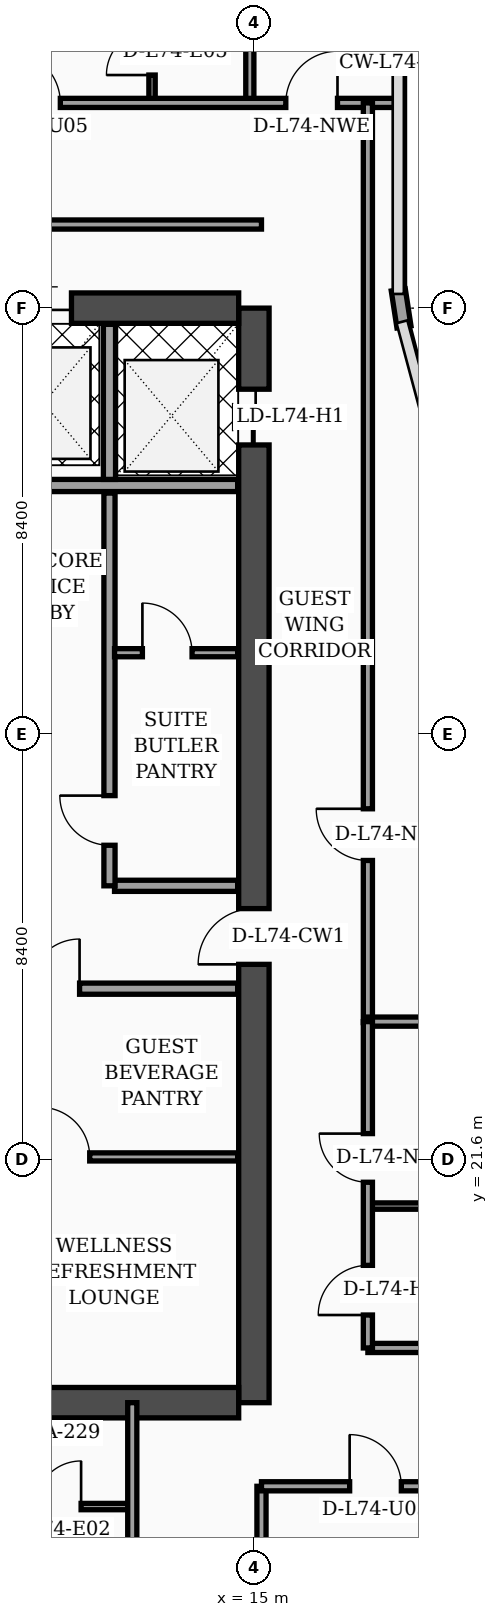
"""IFC4 building model, lengths in metres.
Left out: names, types, materials, properties, quantities, classifications, styles, units other than length and angle.
Written with IfcOpenShell. Run it as: python <this file> out.ifc"""

import sys

from ifc_helpers import new_model, si_unit, direction, frame, frame_2d, origin, place, context, subcontext, project, spatial, rectangle, extrude, element, fill, save


model = new_model("IFC4")
c1 = context("Model", 3, precision=1e-05, world=origin(), true_north=direction((0.0, 1.0)))
c2 = subcontext(c1, "Body", "Model", "MODEL_VIEW")
j1 = project(units=[si_unit("LENGTHUNIT", "METRE"), si_unit("PLANEANGLEUNIT", "RADIAN")], contexts=[c1])
p1 = place(None, origin())
s1 = spatial("IfcSite", under=j1, at=p1, CompositionType="ELEMENT")
p2 = place(p1, origin())
s2 = spatial("IfcBuilding", under=s1, at=p2, CompositionType="ELEMENT")
p3 = place(p2, frame((0.0, 0.0, 298.7)))
s3 = spatial("IfcBuildingStorey", under=s2, at=p3, CompositionType="ELEMENT", Elevation=298.7)
p4 = place(p3, frame((15.0, 16.8, 0.0), z_axis=(0.0, 0.0, 1.0), x_axis=(0.0, 1.0, 0.0)))
e1 = element("IfcWall", 1, at=p4, inside=s3, PredefinedType="SHEAR", context=c2, shape_type="SweptSolid", body=[
    extrude(rectangle(XDim=21.6, YDim=0.6, at=frame_2d((10.8, 0.0))), origin(), (0.0, 0.0, 1.0), 3.56),
])
p5 = place(p4, frame((8.65, 0.0, 0.0)))
e2 = element("IfcOpeningElement", 2, at=p5, cuts=e1, PredefinedType="OPENING", context=c2, shape_type="SweptSolid", body=[
    extrude(rectangle(XDim=1.1, YDim=2.2, at=frame_2d((0.55, 1.1))), frame((0.0, 0.31, 0.0), z_axis=(0.0, -1.0, 0.0), x_axis=(1.0, 0.0, 0.0)), (0.0, 0.0, 1.0), 0.62),
])
p6 = place(p4, frame((18.9, 0.0, 0.0)))
e3 = element("IfcOpeningElement", 3, at=p6, cuts=e1, PredefinedType="OPENING", context=c2, shape_type="SweptSolid", body=[
    extrude(rectangle(XDim=1.1, YDim=2.2, at=frame_2d((0.55, 1.1))), frame((0.0, 0.31, 0.0), z_axis=(0.0, -1.0, 0.0), x_axis=(1.0, 0.0, 0.0)), (0.0, 0.0, 1.0), 0.62),
])
p7 = place(p3, frame((4.5, 38.4, 0.0), z_axis=(0.0, 0.0, 1.0), x_axis=(1.0, 0.0, 0.0)))
e4 = element("IfcWall", 4, at=p7, inside=s3, PredefinedType="SHEAR", context=c2, shape_type="SweptSolid", body=[
    extrude(rectangle(XDim=10.2, YDim=0.6, at=frame_2d((5.1, 0.0))), origin(), (0.0, 0.0, 1.0), 3.56),
])
p8 = place(p7, frame((5.8, 0.0, 0.0)))
e5 = element("IfcOpeningElement", 5, at=p8, cuts=e4, PredefinedType="OPENING", context=c2, shape_type="SweptSolid", body=[
    extrude(rectangle(XDim=1.1, YDim=2.2, at=frame_2d((0.55, 1.1))), frame((0.0, 0.31, 0.0), z_axis=(0.0, -1.0, 0.0), x_axis=(1.0, 0.0, 0.0)), (0.0, 0.0, 1.0), 0.62),
])
p9 = place(p3, frame((4.5, 16.8, 0.0), z_axis=(0.0, 0.0, 1.0), x_axis=(1.0, 0.0, 0.0)))
e6 = element("IfcWall", 6, at=p9, inside=s3, PredefinedType="SHEAR", context=c2, shape_type="SweptSolid", body=[
    extrude(rectangle(XDim=10.2, YDim=0.6, at=frame_2d((5.1, 0.0))), origin(), (0.0, 0.0, 1.0), 3.56),
])
p10 = place(p3, frame((17.962, 38.03, 0.0), z_axis=(0.0, 0.0, 1.0), x_axis=(-0.15141125477, 0.988470855377, 0.0)))
e7 = element("IfcWall", 7, at=p10, inside=s3, PredefinedType="SOLIDWALL", context=c2, shape_type="SweptSolid", body=[
    extrude(rectangle(XDim=0.739, YDim=0.28, at=frame_2d((0.369, 0.0))), origin(), (0.0, 0.0, 1.0), 3.56),
])
p11 = place(p3, frame((9.68, 21.65, 0.0), z_axis=(0.0, 0.0, 1.0), x_axis=(1.0, 0.0, 0.0)))
e8 = element("IfcWall", 8, at=p11, inside=s3, PredefinedType="PARTITIONING", context=c2, shape_type="SweptSolid", body=[
    extrude(rectangle(XDim=5.0, YDim=0.16, at=frame_2d((2.5, 0.0))), origin(), (0.0, 0.0, 1.0), 3.09),
])
p12 = place(p11, frame((1.1, 0.0, 0.0)))
e9 = element("IfcOpeningElement", 9, at=p12, cuts=e8, PredefinedType="OPENING", context=c2, shape_type="SweptSolid", body=[
    extrude(rectangle(XDim=0.98, YDim=2.15, at=frame_2d((0.49, 1.075))), frame((0.0, 0.09, 0.0), z_axis=(0.0, -1.0, 0.0), x_axis=(1.0, 0.0, 0.0)), (0.0, 0.0, 1.0), 0.18),
])
p13 = place(p3, frame((9.68, 24.97, 0.0), z_axis=(0.0, 0.0, 1.0), x_axis=(1.0, 0.0, 0.0)))
e10 = element("IfcWall", 10, at=p13, inside=s3, PredefinedType="SOLIDWALL", context=c2, shape_type="SweptSolid", body=[
    extrude(rectangle(XDim=5.0, YDim=0.22, at=frame_2d((2.5, 0.0))), origin(), (0.0, 0.0, 1.0), 2.99),
])
p14 = place(p13, frame((0.9, 0.0, 0.0)))
e11 = element("IfcOpeningElement", 11, at=p14, cuts=e10, PredefinedType="OPENING", context=c2, shape_type="SweptSolid", body=[
    extrude(rectangle(XDim=0.98, YDim=2.15, at=frame_2d((0.49, 1.075))), frame((0.0, 0.12, 0.0), z_axis=(0.0, -1.0, 0.0), x_axis=(1.0, 0.0, 0.0)), (0.0, 0.0, 1.0), 0.24),
])
p15 = place(p3, frame((12.25, 27.0, 0.0), z_axis=(0.0, 0.0, 1.0), x_axis=(1.0, 0.0, 0.0)))
e12 = element("IfcWall", 12, at=p15, inside=s3, PredefinedType="SOLIDWALL", context=c2, shape_type="SweptSolid", body=[
    extrude(rectangle(XDim=2.43, YDim=0.22, at=frame_2d((1.215, 0.0))), origin(), (0.0, 0.0, 1.0), 3.56),
])
p16 = place(p3, frame((12.15, 27.0, 0.0), z_axis=(0.0, 0.0, 1.0), x_axis=(0.0, 1.0, 0.0)))
e13 = element("IfcWall", 13, at=p16, inside=s3, PredefinedType="SOLIDWALL", context=c2, shape_type="SweptSolid", body=[
    extrude(rectangle(XDim=7.75, YDim=0.22, at=frame_2d((3.875, 0.0))), origin(), (0.0, 0.0, 1.0), 3.56),
])
p17 = place(p16, frame((0.8, 0.0, 0.0)))
e14 = element("IfcOpeningElement", 14, at=p17, cuts=e13, PredefinedType="OPENING", context=c2, shape_type="SweptSolid", body=[
    extrude(rectangle(XDim=0.98, YDim=2.15, at=frame_2d((0.49, 1.075))), frame((0.0, 0.12, 0.0), z_axis=(0.0, -1.0, 0.0), x_axis=(1.0, 0.0, 0.0)), (0.0, 0.0, 1.0), 0.24),
])
p18 = place(p3, frame((12.25, 31.6, 0.0), z_axis=(0.0, 0.0, 1.0), x_axis=(1.0, 0.0, 0.0)))
e15 = element("IfcWall", 15, at=p18, inside=s3, PredefinedType="PARTITIONING", context=c2, shape_type="SweptSolid", body=[
    extrude(rectangle(XDim=2.43, YDim=0.16, at=frame_2d((1.215, 0.0))), origin(), (0.0, 0.0, 1.0), 3.14),
])
p19 = place(p18, frame((0.55, 0.0, 0.0)))
e16 = element("IfcOpeningElement", 16, at=p19, cuts=e15, PredefinedType="OPENING", context=c2, shape_type="SweptSolid", body=[
    extrude(rectangle(XDim=0.98, YDim=2.15, at=frame_2d((0.49, 1.075))), frame((0.0, 0.09, 0.0), z_axis=(0.0, -1.0, 0.0), x_axis=(1.0, 0.0, 0.0)), (0.0, 0.0, 1.0), 0.18),
])
p20 = place(p3, frame((9.66, 34.9, 0.0), z_axis=(0.0, 0.0, 1.0), x_axis=(1.0, 0.0, 0.0)))
e17 = element("IfcWall", 17, at=p20, inside=s3, PredefinedType="SOLIDWALL", context=c2, shape_type="SweptSolid", body=[
    extrude(rectangle(XDim=5.02, YDim=0.24, at=frame_2d((2.51, 0.0))), origin(), (0.0, 0.0, 1.0), 3.56),
])
p21 = place(p3, frame((12.15, 35.02, 0.0), z_axis=(0.0, 0.0, 1.0), x_axis=(0.0, 1.0, 0.0)))
e18 = element("IfcWall", 18, at=p21, inside=s3, PredefinedType="SOLIDWALL", context=c2, shape_type="SweptSolid", body=[
    extrude(rectangle(XDim=3.06, YDim=0.24, at=frame_2d((1.53, 0.0))), origin(), (0.0, 0.0, 1.0), 3.56),
])
p22 = place(p3, frame((0.08, 14.75, 0.0), z_axis=(0.0, 0.0, 1.0), x_axis=(1.0, 0.0, 0.0)))
e19 = element("IfcWall", 19, at=p22, inside=s3, PredefinedType="PARTITIONING", context=c2, shape_type="SweptSolid", body=[
    extrude(rectangle(XDim=12.52, YDim=0.125, at=frame_2d((6.26, 0.0))), origin(), (0.0, 0.0, 1.0), 2.99),
])
p23 = place(p22, frame((4.32, 0.0, 0.0)))
e20 = element("IfcOpeningElement", 20, at=p23, cuts=e19, PredefinedType="OPENING", context=c2, shape_type="SweptSolid", body=[
    extrude(rectangle(XDim=0.96, YDim=2.2, at=frame_2d((0.48, 1.1))), frame((0.0, 0.073, 0.0), z_axis=(0.0, -1.0, 0.0), x_axis=(1.0, 0.0, 0.0)), (0.0, 0.0, 1.0), 0.145),
])
p24 = place(p22, frame((10.61, 0.0, 0.0)))
e21 = element("IfcOpeningElement", 21, at=p24, cuts=e19, PredefinedType="OPENING", context=c2, shape_type="SweptSolid", body=[
    extrude(rectangle(XDim=0.9, YDim=2.15, at=frame_2d((0.45, 1.075))), frame((0.0, 0.073, 0.0), z_axis=(0.0, -1.0, 0.0), x_axis=(1.0, 0.0, 0.0)), (0.0, 0.0, 1.0), 0.145),
])
p25 = place(p3, frame((12.6, 2.44, 0.0), z_axis=(0.0, 0.0, 1.0), x_axis=(0.0, 1.0, 0.0)))
e22 = element("IfcWall", 22, at=p25, inside=s3, PredefinedType="PARTITIONING", context=c2, shape_type="SweptSolid", body=[
    extrude(rectangle(XDim=14.36, YDim=0.18, at=frame_2d((7.18, 0.0))), origin(), (0.0, 0.0, 1.0), 2.99),
])
p26 = place(p25, frame((3.01, 0.0, 0.0)))
e23 = element("IfcOpeningElement", 23, at=p26, cuts=e22, PredefinedType="OPENING", context=c2, shape_type="SweptSolid", body=[
    extrude(rectangle(XDim=1.02, YDim=2.2, at=frame_2d((0.51, 1.1))), frame((0.0, 0.1, 0.0), z_axis=(0.0, -1.0, 0.0), x_axis=(1.0, 0.0, 0.0)), (0.0, 0.0, 1.0), 0.2),
])
p27 = place(p25, frame((9.35, 0.0, 0.0)))
e24 = element("IfcOpeningElement", 24, at=p27, cuts=e22, PredefinedType="OPENING", context=c2, shape_type="SweptSolid", body=[
    extrude(rectangle(XDim=1.02, YDim=2.2, at=frame_2d((0.51, 1.1))), frame((0.0, 0.1, 0.0), z_axis=(0.0, -1.0, 0.0), x_axis=(1.0, 0.0, 0.0)), (0.0, 0.0, 1.0), 0.2),
])
p28 = place(p3, frame((15.15, 2.44, 0.0), z_axis=(0.0, 0.0, 1.0), x_axis=(0.0, 1.0, 0.0)))
e25 = element("IfcWall", 25, at=p28, inside=s3, PredefinedType="PARTITIONING", context=c2, shape_type="SweptSolid", body=[
    extrude(rectangle(XDim=12.71, YDim=0.18, at=frame_2d((6.355, 0.0))), origin(), (0.0, 0.0, 1.0), 3.09),
])
p29 = place(p3, frame((15.15, 15.15, 0.0), z_axis=(0.0, 0.0, 1.0), x_axis=(1.0, 0.0, 0.0)))
e26 = element("IfcWall", 26, at=p29, inside=s3, PredefinedType="PARTITIONING", context=c2, shape_type="SweptSolid", body=[
    extrude(rectangle(XDim=6.45, YDim=0.18, at=frame_2d((3.225, 0.0))), origin(), (0.0, 0.0, 1.0), 2.59),
])
p30 = place(p29, frame((1.74, 0.0, 0.0)))
e27 = element("IfcOpeningElement", 27, at=p30, cuts=e26, PredefinedType="OPENING", context=c2, shape_type="SweptSolid", body=[
    extrude(rectangle(XDim=1.02, YDim=2.2, at=frame_2d((0.51, 1.1))), frame((0.0, 0.1, 0.0), z_axis=(0.0, -1.0, 0.0), x_axis=(1.0, 0.0, 0.0)), (0.0, 0.0, 1.0), 0.2),
])
p31 = place(p3, frame((14.92, 42.45, 0.0), z_axis=(0.0, 0.0, 1.0), x_axis=(0.0, 1.0, 0.0)))
e28 = element("IfcWall", 28, at=p31, inside=s3, PredefinedType="PARTITIONING", context=c2, shape_type="SweptSolid", body=[
    extrude(rectangle(XDim=5.35, YDim=0.16, at=frame_2d((2.675, 0.0))), origin(), (0.0, 0.0, 1.0), 3.09),
])
p32 = place(p3, frame((12.99, 42.45, 0.0), z_axis=(0.0, 0.0, 1.0), x_axis=(0.0, 1.0, 0.0)))
e29 = element("IfcWall", 29, at=p32, inside=s3, PredefinedType="PARTITIONING", context=c2, shape_type="SweptSolid", body=[
    extrude(rectangle(XDim=8.49, YDim=0.125, at=frame_2d((4.245, 0.0))), origin(), (0.0, 0.0, 1.0), 3.09),
])
p33 = place(p32, frame((0.55, 0.0, 0.0)))
e30 = element("IfcOpeningElement", 30, at=p33, cuts=e29, PredefinedType="OPENING", context=c2, shape_type="SweptSolid", body=[
    extrude(rectangle(XDim=0.9, YDim=2.15, at=frame_2d((0.45, 1.075))), frame((0.0, 0.073, 0.0), z_axis=(0.0, -1.0, 0.0), x_axis=(1.0, 0.0, 0.0)), (0.0, 0.0, 1.0), 0.145),
])
p34 = place(p32, frame((4.72, 0.0, 0.0)))
e31 = element("IfcOpeningElement", 31, at=p34, cuts=e29, PredefinedType="OPENING", context=c2, shape_type="SweptSolid", body=[
    extrude(rectangle(XDim=0.96, YDim=2.2, at=frame_2d((0.48, 1.1))), frame((0.0, 0.073, 0.0), z_axis=(0.0, -1.0, 0.0), x_axis=(1.0, 0.0, 0.0)), (0.0, 0.0, 1.0), 0.145),
])
p35 = place(p3, frame((0.08, 42.45, 0.0), z_axis=(0.0, 0.0, 1.0), x_axis=(1.0, 0.0, 0.0)))
e32 = element("IfcWall", 32, at=p35, inside=s3, PredefinedType="PARTITIONING", context=c2, shape_type="SweptSolid", body=[
    extrude(rectangle(XDim=17.77, YDim=0.18, at=frame_2d((8.885, 0.0))), origin(), (0.0, 0.0, 1.0), 2.99),
])
p36 = place(p35, frame((0.9, 0.0, 0.0)))
e33 = element("IfcOpeningElement", 33, at=p36, cuts=e32, PredefinedType="OPENING", context=c2, shape_type="SweptSolid", body=[
    extrude(rectangle(XDim=1.02, YDim=2.2, at=frame_2d((0.51, 1.1))), frame((0.0, 0.1, 0.0), z_axis=(0.0, -1.0, 0.0), x_axis=(1.0, 0.0, 0.0)), (0.0, 0.0, 1.0), 0.2),
])
p37 = place(p35, frame((4.2, 0.0, 0.0)))
e34 = element("IfcOpeningElement", 34, at=p37, cuts=e32, PredefinedType="OPENING", context=c2, shape_type="SweptSolid", body=[
    extrude(rectangle(XDim=1.02, YDim=2.2, at=frame_2d((0.51, 1.1))), frame((0.0, 0.1, 0.0), z_axis=(0.0, -1.0, 0.0), x_axis=(1.0, 0.0, 0.0)), (0.0, 0.0, 1.0), 0.2),
])
p38 = place(p35, frame((10.08, 0.0, 0.0)))
e35 = element("IfcOpeningElement", 35, at=p38, cuts=e32, PredefinedType="OPENING", context=c2, shape_type="SweptSolid", body=[
    extrude(rectangle(XDim=1.02, YDim=2.2, at=frame_2d((0.51, 1.1))), frame((0.0, 0.1, 0.0), z_axis=(0.0, -1.0, 0.0), x_axis=(1.0, 0.0, 0.0)), (0.0, 0.0, 1.0), 0.2),
])
p39 = place(p35, frame((15.55, 0.0, 0.0)))
e36 = element("IfcOpeningElement", 36, at=p39, cuts=e32, PredefinedType="OPENING", context=c2, shape_type="SweptSolid", body=[
    extrude(rectangle(XDim=1.02, YDim=2.2, at=frame_2d((0.51, 1.1))), frame((0.0, 0.1, 0.0), z_axis=(0.0, -1.0, 0.0), x_axis=(1.0, 0.0, 0.0)), (0.0, 0.0, 1.0), 0.2),
])
p40 = place(p3, frame((17.25, 24.3, 0.0), z_axis=(0.0, 0.0, 1.0), x_axis=(0.0, 1.0, 0.0)))
e37 = element("IfcWall", 37, at=p40, inside=s3, PredefinedType="PARTITIONING", context=c2, shape_type="SweptSolid", body=[
    extrude(rectangle(XDim=18.15, YDim=0.18, at=frame_2d((9.075, 0.0))), origin(), (0.0, 0.0, 1.0), 2.99),
])
p41 = place(p40, frame((3.2, 0.0, 0.0)))
e38 = element("IfcOpeningElement", 38, at=p41, cuts=e37, PredefinedType="OPENING", context=c2, shape_type="SweptSolid", body=[
    extrude(rectangle(XDim=1.02, YDim=2.2, at=frame_2d((0.51, 1.1))), frame((0.0, 0.1, 0.0), z_axis=(0.0, -1.0, 0.0), x_axis=(1.0, 0.0, 0.0)), (0.0, 0.0, 1.0), 0.2),
])
p42 = place(p3, frame((3.88, 40.05, 0.0), z_axis=(0.0, 0.0, 1.0), x_axis=(1.0, 0.0, 0.0)))
e39 = element("IfcWall", 39, at=p42, inside=s3, PredefinedType="PARTITIONING", context=c2, shape_type="SweptSolid", body=[
    extrude(rectangle(XDim=11.27, YDim=0.18, at=frame_2d((5.635, 0.0))), origin(), (0.0, 0.0, 1.0), 2.99),
])
p43 = place(p3, frame((17.25, 17.88, 0.0), z_axis=(0.0, 0.0, 1.0), x_axis=(1.0, 0.0, 0.0)))
e40 = element("IfcWall", 40, at=p43, inside=s3, PredefinedType="PARTITIONING", context=c2, shape_type="SweptSolid", body=[
    extrude(rectangle(XDim=4.3, YDim=0.18, at=frame_2d((2.15, 0.0))), origin(), (0.0, 0.0, 1.0), 3.56),
])
p44 = place(p3, frame((17.25, 20.68, 0.0), z_axis=(0.0, 0.0, 1.0), x_axis=(1.0, 0.0, 0.0)))
e41 = element("IfcWall", 41, at=p44, inside=s3, PredefinedType="PARTITIONING", context=c2, shape_type="SweptSolid", body=[
    extrude(rectangle(XDim=4.3, YDim=0.125, at=frame_2d((2.15, 0.0))), origin(), (0.0, 0.0, 1.0), 3.56),
])
p45 = place(p3, frame((17.25, 24.32, 0.0), z_axis=(0.0, 0.0, 1.0), x_axis=(1.0, 0.0, 0.0)))
e42 = element("IfcWall", 42, at=p45, inside=s3, PredefinedType="PARTITIONING", context=c2, shape_type="SweptSolid", body=[
    extrude(rectangle(XDim=4.35, YDim=0.18, at=frame_2d((2.175, 0.0))), origin(), (0.0, 0.0, 1.0), 3.56),
])
p46 = place(p3, frame((17.25, 17.88, 0.0), z_axis=(0.0, 0.0, 1.0), x_axis=(0.0, 1.0, 0.0)))
e43 = element("IfcWall", 43, at=p46, inside=s3, PredefinedType="PARTITIONING", context=c2, shape_type="SweptSolid", body=[
    extrude(rectangle(XDim=6.44, YDim=0.18, at=frame_2d((3.22, 0.0))), origin(), (0.0, 0.0, 1.0), 3.09),
])
p47 = place(p46, frame((0.65, 0.0, 0.0)))
e44 = element("IfcOpeningElement", 44, at=p47, cuts=e43, PredefinedType="OPENING", context=c2, shape_type="SweptSolid", body=[
    extrude(rectangle(XDim=0.98, YDim=2.15, at=frame_2d((0.49, 1.075))), frame((0.0, 0.1, 0.0), z_axis=(0.0, -1.0, 0.0), x_axis=(1.0, 0.0, 0.0)), (0.0, 0.0, 1.0), 0.2),
])
p48 = place(p46, frame((3.27, 0.0, 0.0)))
e45 = element("IfcOpeningElement", 45, at=p48, cuts=e43, PredefinedType="OPENING", context=c2, shape_type="SweptSolid", body=[
    extrude(rectangle(XDim=0.96, YDim=2.2, at=frame_2d((0.48, 1.1))), frame((0.0, 0.1, 0.0), z_axis=(0.0, -1.0, 0.0), x_axis=(1.0, 0.0, 0.0)), (0.0, 0.0, 1.0), 0.2),
])
p49 = place(p12, origin())
e46 = element("IfcDoor", 46, at=p49, inside=s3, OperationType="SINGLE_SWING_LEFT", PredefinedType="DOOR", context=c2, shape_type="SweptSolid", body=[
    extrude(rectangle(XDim=0.98, YDim=2.15, at=frame_2d((0.49, 1.075))), frame((0.0, 0.025, 0.0), z_axis=(0.0, -1.0, 0.0), x_axis=(1.0, 0.0, 0.0)), (0.0, 0.0, 1.0), 0.05),
])
fill(e9, e46)
p50 = place(p14, origin())
e47 = element("IfcDoor", 47, at=p50, inside=s3, OperationType="SINGLE_SWING_RIGHT", PredefinedType="DOOR", context=c2, shape_type="SweptSolid", body=[
    extrude(rectangle(XDim=0.98, YDim=2.15, at=frame_2d((0.49, 1.075))), frame((0.0, 0.025, 0.0), z_axis=(0.0, -1.0, 0.0), x_axis=(1.0, 0.0, 0.0)), (0.0, 0.0, 1.0), 0.05),
])
fill(e11, e47)
p51 = place(p17, origin())
e48 = element("IfcDoor", 48, at=p51, inside=s3, OperationType="SINGLE_SWING_RIGHT", PredefinedType="DOOR", context=c2, shape_type="SweptSolid", body=[
    extrude(rectangle(XDim=0.98, YDim=2.15, at=frame_2d((0.49, 1.075))), frame((0.0, 0.025, 0.0), z_axis=(0.0, -1.0, 0.0), x_axis=(1.0, 0.0, 0.0)), (0.0, 0.0, 1.0), 0.05),
])
fill(e14, e48)
p52 = place(p19, origin())
e49 = element("IfcDoor", 49, at=p52, inside=s3, OperationType="SINGLE_SWING_LEFT", PredefinedType="DOOR", context=c2, shape_type="SweptSolid", body=[
    extrude(rectangle(XDim=0.98, YDim=2.15, at=frame_2d((0.49, 1.075))), frame((0.0, 0.025, 0.0), z_axis=(0.0, -1.0, 0.0), x_axis=(1.0, 0.0, 0.0)), (0.0, 0.0, 1.0), 0.05),
])
fill(e16, e49)
p53 = place(p24, origin())
e50 = element("IfcDoor", 50, at=p53, inside=s3, OperationType="SINGLE_SWING_RIGHT", PredefinedType="DOOR", context=c2, shape_type="SweptSolid", body=[
    extrude(rectangle(XDim=0.9, YDim=2.15, at=frame_2d((0.45, 1.075))), frame((0.0, 0.025, 0.0), z_axis=(0.0, -1.0, 0.0), x_axis=(1.0, 0.0, 0.0)), (0.0, 0.0, 1.0), 0.05),
])
fill(e21, e50)
p54 = place(p30, origin())
e51 = element("IfcDoor", 51, at=p54, inside=s3, OperationType="SINGLE_SWING_LEFT", PredefinedType="DOOR", context=c2, shape_type="SweptSolid", body=[
    extrude(rectangle(XDim=1.02, YDim=2.2, at=frame_2d((0.51, 1.1))), frame((0.0, 0.025, 0.0), z_axis=(0.0, -1.0, 0.0), x_axis=(1.0, 0.0, 0.0)), (0.0, 0.0, 1.0), 0.05),
])
fill(e27, e51)
p55 = place(p33, origin())
e52 = element("IfcDoor", 52, at=p55, inside=s3, OperationType="SINGLE_SWING_LEFT", PredefinedType="DOOR", context=c2, shape_type="SweptSolid", body=[
    extrude(rectangle(XDim=0.9, YDim=2.15, at=frame_2d((0.45, 1.075))), frame((0.0, 0.025, 0.0), z_axis=(0.0, -1.0, 0.0), x_axis=(1.0, 0.0, 0.0)), (0.0, 0.0, 1.0), 0.05),
])
fill(e30, e52)
p56 = place(p38, origin())
e53 = element("IfcDoor", 53, at=p56, inside=s3, OperationType="SINGLE_SWING_LEFT", PredefinedType="DOOR", context=c2, shape_type="SweptSolid", body=[
    extrude(rectangle(XDim=1.02, YDim=2.2, at=frame_2d((0.51, 1.1))), frame((0.0, 0.025, 0.0), z_axis=(0.0, -1.0, 0.0), x_axis=(1.0, 0.0, 0.0)), (0.0, 0.0, 1.0), 0.05),
])
fill(e35, e53)
p57 = place(p39, origin())
e54 = element("IfcDoor", 54, at=p57, inside=s3, OperationType="SINGLE_SWING_RIGHT", PredefinedType="DOOR", context=c2, shape_type="SweptSolid", body=[
    extrude(rectangle(XDim=1.02, YDim=2.2, at=frame_2d((0.51, 1.1))), frame((0.0, 0.025, 0.0), z_axis=(0.0, -1.0, 0.0), x_axis=(1.0, 0.0, 0.0)), (0.0, 0.0, 1.0), 0.05),
])
fill(e36, e54)
p58 = place(p41, origin())
e55 = element("IfcDoor", 55, at=p58, inside=s3, OperationType="SINGLE_SWING_RIGHT", PredefinedType="DOOR", context=c2, shape_type="SweptSolid", body=[
    extrude(rectangle(XDim=1.02, YDim=2.2, at=frame_2d((0.51, 1.1))), frame((0.0, 0.025, 0.0), z_axis=(0.0, -1.0, 0.0), x_axis=(1.0, 0.0, 0.0)), (0.0, 0.0, 1.0), 0.05),
])
fill(e38, e55)
p59 = place(p47, origin())
e56 = element("IfcDoor", 56, at=p59, inside=s3, OperationType="SINGLE_SWING_LEFT", PredefinedType="DOOR", context=c2, shape_type="SweptSolid", body=[
    extrude(rectangle(XDim=0.98, YDim=2.15, at=frame_2d((0.49, 1.075))), frame((0.0, 0.025, 0.0), z_axis=(0.0, -1.0, 0.0), x_axis=(1.0, 0.0, 0.0)), (0.0, 0.0, 1.0), 0.05),
])
fill(e44, e56)
p60 = place(p48, origin())
e57 = element("IfcDoor", 57, at=p60, inside=s3, OperationType="SINGLE_SWING_RIGHT", PredefinedType="DOOR", context=c2, shape_type="SweptSolid", body=[
    extrude(rectangle(XDim=0.96, YDim=2.2, at=frame_2d((0.48, 1.1))), frame((0.0, 0.025, 0.0), z_axis=(0.0, -1.0, 0.0), x_axis=(1.0, 0.0, 0.0)), (0.0, 0.0, 1.0), 0.05),
])
fill(e45, e57)
p61 = place(p5, origin())
e58 = element("IfcDoor", 58, at=p61, inside=s3, OperationType="SINGLE_SWING_LEFT", PredefinedType="DOOR", context=c2, shape_type="SweptSolid", body=[
    extrude(rectangle(XDim=1.1, YDim=2.2, at=frame_2d((0.55, 1.1))), frame((0.0, 0.025, 0.0), z_axis=(0.0, -1.0, 0.0), x_axis=(1.0, 0.0, 0.0)), (0.0, 0.0, 1.0), 0.05),
])
fill(e2, e58)
p62 = place(p6, origin())
e59 = element("IfcDoor", 59, at=p62, inside=s3, OperationType="DOUBLE_DOOR_SLIDING", PredefinedType="DOOR", context=c2, shape_type="SweptSolid", body=[
    extrude(rectangle(XDim=1.1, YDim=2.2, at=frame_2d((0.55, 1.1))), frame((0.0, 0.025, 0.0), z_axis=(0.0, -1.0, 0.0), x_axis=(1.0, 0.0, 0.0)), (0.0, 0.0, 1.0), 0.05),
])
fill(e3, e59)
p63 = place(p8, origin())
e60 = element("IfcDoor", 60, at=p63, inside=s3, OperationType="DOUBLE_DOOR_SLIDING", PredefinedType="DOOR", context=c2, shape_type="SweptSolid", body=[
    extrude(rectangle(XDim=1.1, YDim=2.2, at=frame_2d((0.55, 1.1))), frame((0.0, 0.025, 0.0), z_axis=(0.0, -1.0, 0.0), x_axis=(1.0, 0.0, 0.0)), (0.0, 0.0, 1.0), 0.05),
])
fill(e5, e60)
save(model, sys.argv[1])
